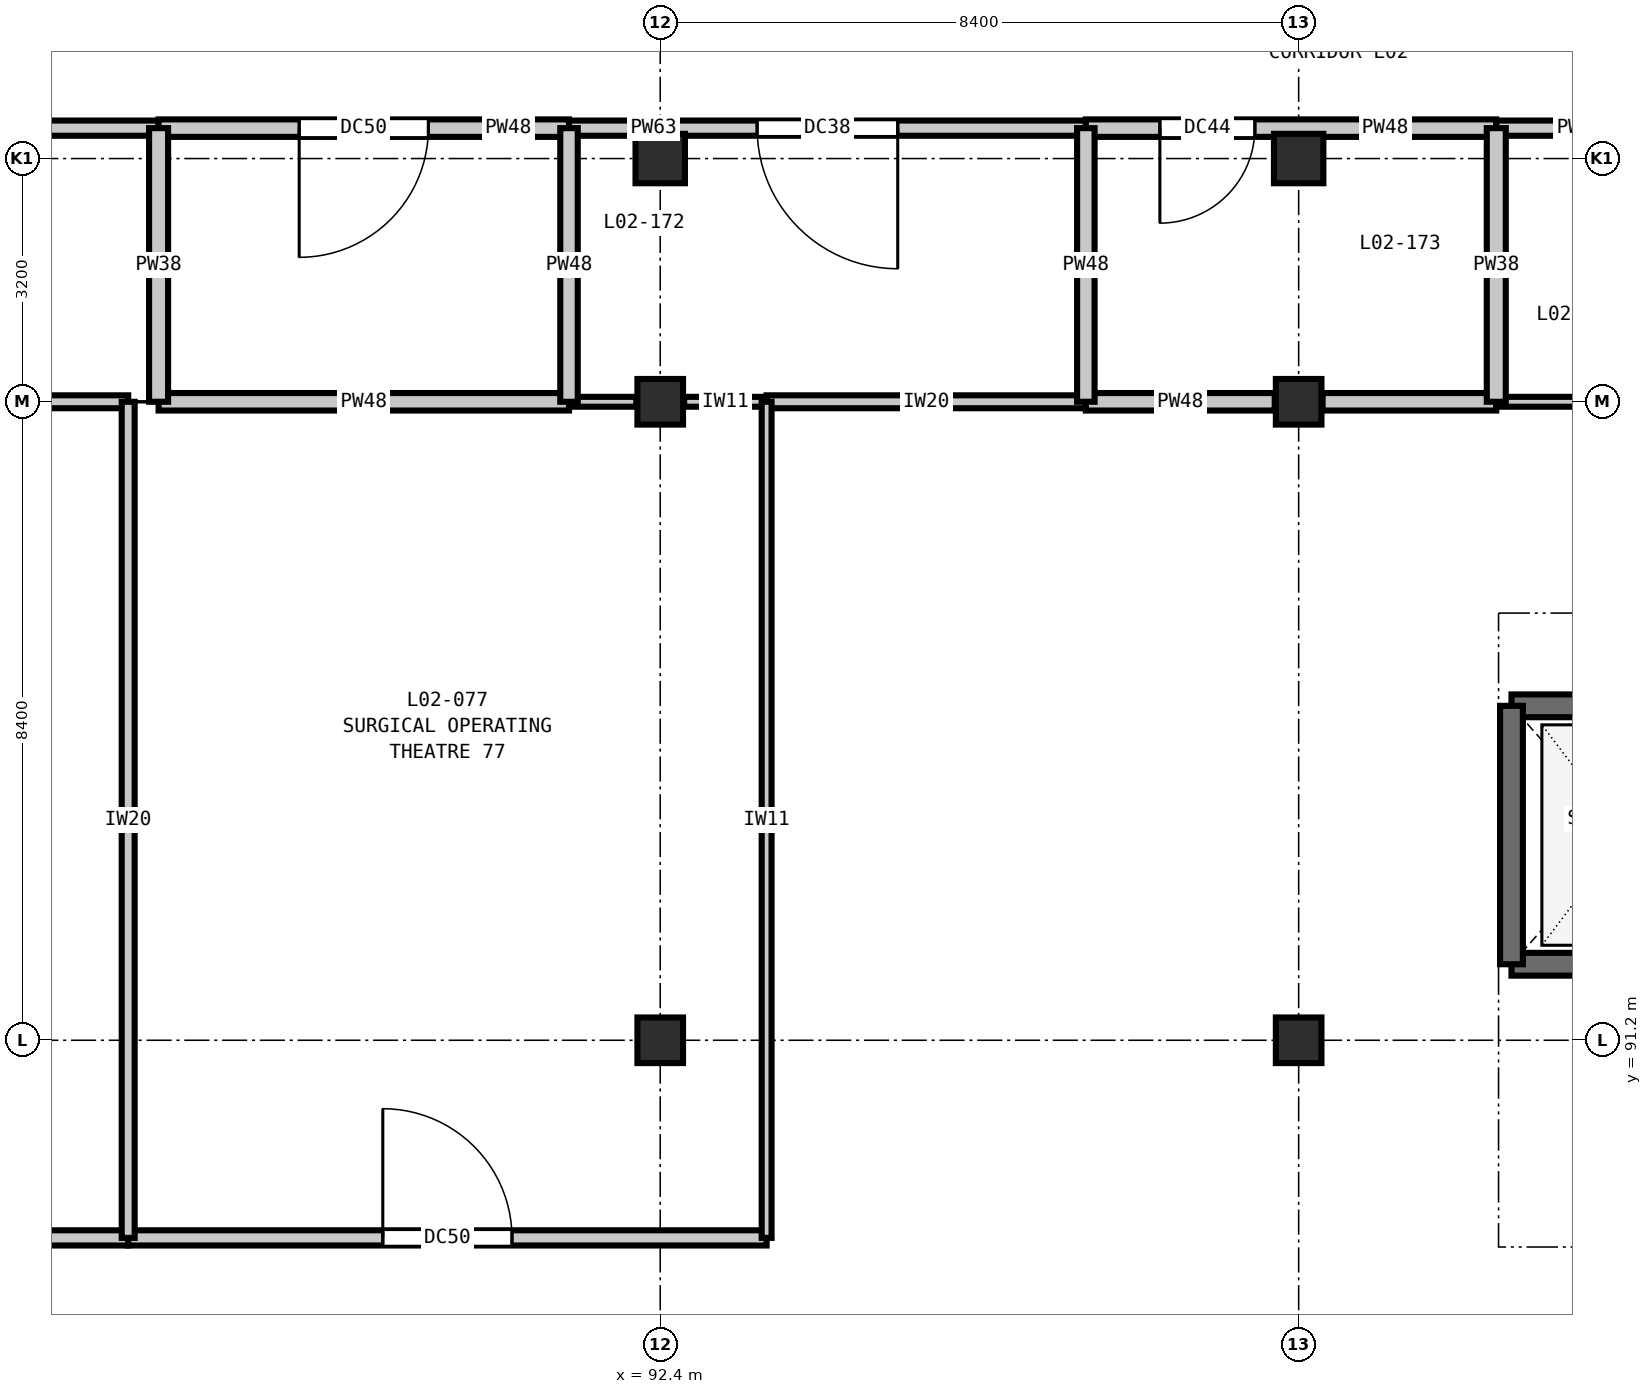
"""IFC4 building model, lengths in metres.
Left out: names, types, materials, properties, quantities, classifications, styles, units other than length and angle.
Written with IfcOpenShell. Run it as: python <this file> out.ifc"""

import sys

from ifc_helpers import new_model, si_unit, direction, frame, frame_2d, origin, origin_2d, place, context, subcontext, project, spatial, rectangle, extrude, element, fill, save


model = new_model("IFC4")
c1 = context("Model", 3, precision=1e-05, world=origin(), true_north=direction((0.0, 1.0)))
c2 = subcontext(c1, "Body", "Model", "MODEL_VIEW")
j1 = project(units=[si_unit("LENGTHUNIT", "METRE"), si_unit("PLANEANGLEUNIT", "RADIAN")], contexts=[c1])
p1 = place(None, origin())
s1 = spatial("IfcSite", under=j1, at=p1, CompositionType="ELEMENT")
p2 = place(p1, origin())
s2 = spatial("IfcBuilding", under=s1, at=p2, CompositionType="ELEMENT")
p3 = place(p2, frame((0.0, 0.0, 10.8)))
s3 = spatial("IfcBuildingStorey", under=s2, at=p3, CompositionType="ELEMENT", Elevation=10.8)
for number, where, z_axis, x_axis in (
    (1, (92.4, 91.2, 0.0), (0.0, 0.0, 1.0), (1.0, 0.0, 0.0)),
    (2, (92.4, 99.6, 0.0), (0.0, 0.0, 1.0), (1.0, 0.0, 0.0)),
):
    element("IfcColumn", number, at=place(p3, frame(where, z_axis=z_axis, x_axis=x_axis)), inside=s3, PredefinedType="COLUMN", context=c2, shape_type="SweptSolid", body=[
        extrude(rectangle(XDim=0.6, YDim=0.6, at=origin_2d()), origin(), (0.0, 0.0, 1.0), 5.4),
    ])
p4 = place(p3, frame((92.4, 102.8, 0.0), z_axis=(0.0, 0.0, 1.0), x_axis=(1.0, 0.0, 0.0)))
e3 = element("IfcColumn", 3, at=p4, inside=s3, PredefinedType="COLUMN", context=c2, shape_type="SweptSolid", body=[
    extrude(rectangle(XDim=0.65, YDim=0.65, at=origin_2d()), origin(), (0.0, 0.0, 1.0), 5.4),
])
for number, where, z_axis, x_axis in (
    (4, (100.8, 91.2, 0.0), (0.0, 0.0, 1.0), (1.0, 0.0, 0.0)),
    (5, (100.8, 99.6, 0.0), (0.0, 0.0, 1.0), (1.0, 0.0, 0.0)),
):
    element("IfcColumn", number, at=place(p3, frame(where, z_axis=z_axis, x_axis=x_axis)), inside=s3, PredefinedType="COLUMN", context=c2, shape_type="SweptSolid", body=[
        extrude(rectangle(XDim=0.6, YDim=0.6, at=origin_2d()), origin(), (0.0, 0.0, 1.0), 5.4),
    ])
p5 = place(p3, frame((100.8, 102.8, 0.0), z_axis=(0.0, 0.0, 1.0), x_axis=(1.0, 0.0, 0.0)))
e6 = element("IfcColumn", 6, at=p5, inside=s3, PredefinedType="COLUMN", context=c2, shape_type="SweptSolid", body=[
    extrude(rectangle(XDim=0.65, YDim=0.65, at=origin_2d()), origin(), (0.0, 0.0, 1.0), 5.4),
])
p6 = place(p3, frame((103.6, 92.2, 0.0), z_axis=(0.0, 0.0, 1.0), x_axis=(1.0, 0.0, 0.0)))
e7 = element("IfcWall", 7, at=p6, inside=s3, PredefinedType="SHEAR", context=c2, shape_type="SweptSolid", body=[
    extrude(rectangle(XDim=3.0, YDim=0.3, at=frame_2d((1.5, 0.0))), origin(), (0.0, 0.0, 1.0), 5.4),
])
p7 = place(p6, frame((0.85, 0.0, 0.0)))
e8 = element("IfcOpeningElement", 8, at=p7, cuts=e7, PredefinedType="OPENING", context=c2, shape_type="SweptSolid", body=[
    extrude(rectangle(XDim=1.3, YDim=2.2, at=frame_2d((0.65, 1.1))), frame((0.0, 0.16, 0.0), z_axis=(0.0, -1.0, 0.0), x_axis=(1.0, 0.0, 0.0)), (0.0, 0.0, 1.0), 0.32),
])
p8 = place(p3, frame((106.6, 95.6, 0.0), z_axis=(0.0, 0.0, 1.0), x_axis=(-1.0, 0.0, 0.0)))
e9 = element("IfcWall", 9, at=p8, inside=s3, PredefinedType="SHEAR", context=c2, shape_type="SweptSolid", body=[
    extrude(rectangle(XDim=3.0, YDim=0.3, at=frame_2d((1.5, 0.0))), origin(), (0.0, 0.0, 1.0), 5.4),
])
p9 = place(p3, frame((103.6, 95.6, 0.0), z_axis=(0.0, 0.0, 1.0), x_axis=(0.0, -1.0, 0.0)))
e10 = element("IfcWall", 10, at=p9, inside=s3, PredefinedType="SHEAR", context=c2, shape_type="SweptSolid", body=[
    extrude(rectangle(XDim=3.4, YDim=0.3, at=frame_2d((1.7, 0.0))), origin(), (0.0, 0.0, 1.0), 5.4),
])
p10 = place(p3, frame((75.6, 88.6, 0.0), z_axis=(0.0, 0.0, 1.0), x_axis=(1.0, 0.0, 0.0)))
e11 = element("IfcWall", 11, at=p10, inside=s3, PredefinedType="PARTITIONING", context=c2, shape_type="SweptSolid", body=[
    extrude(rectangle(XDim=9.8, YDim=0.2, at=frame_2d((4.9, 0.0))), origin(), (0.0, 0.0, 1.0), 5.07),
])
p11 = place(p10, frame((4.125, 0.0, 0.0)))
e12 = element("IfcOpeningElement", 12, at=p11, cuts=e11, PredefinedType="OPENING", context=c2, shape_type="SweptSolid", body=[
    extrude(rectangle(XDim=1.55, YDim=2.25, at=frame_2d((0.775, 1.125))), frame((0.0, 0.11, 0.0), z_axis=(0.0, -1.0, 0.0), x_axis=(1.0, 0.0, 0.0)), (0.0, 0.0, 1.0), 0.22),
])
p12 = place(p3, frame((85.4, 88.6, 0.0), z_axis=(0.0, 0.0, 1.0), x_axis=(1.0, 0.0, 0.0)))
e13 = element("IfcWall", 13, at=p12, inside=s3, PredefinedType="PARTITIONING", context=c2, shape_type="SweptSolid", body=[
    extrude(rectangle(XDim=8.4, YDim=0.2, at=frame_2d((4.2, 0.0))), origin(), (0.0, 0.0, 1.0), 5.07),
])
p13 = place(p12, frame((3.35, 0.0, 0.0)))
e14 = element("IfcOpeningElement", 14, at=p13, cuts=e13, PredefinedType="OPENING", context=c2, shape_type="SweptSolid", body=[
    extrude(rectangle(XDim=1.7, YDim=2.3, at=frame_2d((0.85, 1.15))), frame((0.0, 0.11, 0.0), z_axis=(0.0, -1.0, 0.0), x_axis=(1.0, 0.0, 0.0)), (0.0, 0.0, 1.0), 0.22),
])
p14 = place(p3, frame((84.315, 99.6, 0.0), z_axis=(0.0, 0.0, 1.0), x_axis=(1.0, 0.0, 0.0)))
e15 = element("IfcWall", 15, at=p14, inside=s3, PredefinedType="PARTITIONING", context=c2, shape_type="SweptSolid", body=[
    extrude(rectangle(XDim=1.085, YDim=0.17, at=frame_2d((0.542, 0.0))), origin(), (0.0, 0.0, 1.0), 4.735),
])
p15 = place(p3, frame((85.8, 99.6, 0.0), z_axis=(0.0, 0.0, 1.0), x_axis=(1.0, 0.0, 0.0)))
e16 = element("IfcWall", 16, at=p15, inside=s3, PredefinedType="PARTITIONING", context=c2, shape_type="SweptSolid", body=[
    extrude(rectangle(XDim=5.4, YDim=0.23, at=frame_2d((2.7, 0.0))), origin(), (0.0, 0.0, 1.0), 4.735),
])
p16 = place(p3, frame((92.715, 99.6, 0.0), z_axis=(0.0, 0.0, 1.0), x_axis=(1.0, 0.0, 0.0)))
e17 = element("IfcWall", 17, at=p16, inside=s3, PredefinedType="PARTITIONING", context=c2, shape_type="SweptSolid", body=[
    extrude(rectangle(XDim=1.085, YDim=0.13, at=frame_2d((0.542, 0.0))), origin(), (0.0, 0.0, 1.0), 4.735),
])
p17 = place(p3, frame((91.2, 99.6, 0.0), z_axis=(0.0, 0.0, 1.0), x_axis=(1.0, 0.0, 0.0)))
e18 = element("IfcWall", 18, at=p17, inside=s3, PredefinedType="PARTITIONING", context=c2, shape_type="SweptSolid", body=[
    extrude(rectangle(XDim=0.885, YDim=0.13, at=frame_2d((0.442, 0.0))), origin(), (0.0, 0.0, 1.0), 4.735),
])
p18 = place(p3, frame((93.8, 99.6, 0.0), z_axis=(0.0, 0.0, 1.0), x_axis=(1.0, 0.0, 0.0)))
e19 = element("IfcWall", 19, at=p18, inside=s3, PredefinedType="PARTITIONING", context=c2, shape_type="SweptSolid", body=[
    extrude(rectangle(XDim=4.2, YDim=0.17, at=frame_2d((2.1, 0.0))), origin(), (0.0, 0.0, 1.0), 4.735),
])
p19 = place(p3, frame((98.0, 99.6, 0.0), z_axis=(0.0, 0.0, 1.0), x_axis=(1.0, 0.0, 0.0)))
e20 = element("IfcWall", 20, at=p19, inside=s3, PredefinedType="PARTITIONING", context=c2, shape_type="SweptSolid", body=[
    extrude(rectangle(XDim=2.485, YDim=0.23, at=frame_2d((1.243, 0.0))), origin(), (0.0, 0.0, 1.0), 4.735),
])
p20 = place(p3, frame((101.115, 99.6, 0.0), z_axis=(0.0, 0.0, 1.0), x_axis=(1.0, 0.0, 0.0)))
e21 = element("IfcWall", 21, at=p20, inside=s3, PredefinedType="PARTITIONING", context=c2, shape_type="SweptSolid", body=[
    extrude(rectangle(XDim=2.285, YDim=0.23, at=frame_2d((1.143, 0.0))), origin(), (0.0, 0.0, 1.0), 4.735),
])
p21 = place(p3, frame((103.4, 99.6, 0.0), z_axis=(0.0, 0.0, 1.0), x_axis=(1.0, 0.0, 0.0)))
e22 = element("IfcWall", 22, at=p21, inside=s3, PredefinedType="PARTITIONING", context=c2, shape_type="SweptSolid", body=[
    extrude(rectangle(XDim=5.485, YDim=0.13, at=frame_2d((2.743, 0.0))), origin(), (0.0, 0.0, 1.0), 4.735),
])
p22 = place(p3, frame((79.0, 103.2, 0.0), z_axis=(0.0, 0.0, 1.0), x_axis=(1.0, 0.0, 0.0)))
e23 = element("IfcWall", 23, at=p22, inside=s3, PredefinedType="PARTITIONING", context=c2, shape_type="SweptSolid", body=[
    extrude(rectangle(XDim=6.8, YDim=0.2, at=frame_2d((3.4, 0.0))), origin(), (0.0, 0.0, 1.0), 5.07),
])
p23 = place(p22, frame((2.625, 0.0, 0.0)))
e24 = element("IfcOpeningElement", 24, at=p23, cuts=e23, PredefinedType="OPENING", context=c2, shape_type="SweptSolid", body=[
    extrude(rectangle(XDim=1.55, YDim=2.25, at=frame_2d((0.775, 1.125))), frame((0.0, 0.11, 0.0), z_axis=(0.0, -1.0, 0.0), x_axis=(1.0, 0.0, 0.0)), (0.0, 0.0, 1.0), 0.22),
])
p24 = place(p3, frame((85.8, 103.2, 0.0), z_axis=(0.0, 0.0, 1.0), x_axis=(1.0, 0.0, 0.0)))
e25 = element("IfcWall", 25, at=p24, inside=s3, PredefinedType="PARTITIONING", context=c2, shape_type="SweptSolid", body=[
    extrude(rectangle(XDim=5.4, YDim=0.23, at=frame_2d((2.7, 0.0))), origin(), (0.0, 0.0, 1.0), 5.07),
])
p25 = place(p24, frame((1.85, 0.0, 0.0)))
e26 = element("IfcOpeningElement", 26, at=p25, cuts=e25, PredefinedType="OPENING", context=c2, shape_type="SweptSolid", body=[
    extrude(rectangle(XDim=1.7, YDim=2.3, at=frame_2d((0.85, 1.15))), frame((0.0, 0.125, 0.0), z_axis=(0.0, -1.0, 0.0), x_axis=(1.0, 0.0, 0.0)), (0.0, 0.0, 1.0), 0.25),
])
p26 = place(p3, frame((91.2, 103.2, 0.0), z_axis=(0.0, 0.0, 1.0), x_axis=(1.0, 0.0, 0.0)))
e27 = element("IfcWall", 27, at=p26, inside=s3, PredefinedType="PARTITIONING", context=c2, shape_type="SweptSolid", body=[
    extrude(rectangle(XDim=6.8, YDim=0.2, at=frame_2d((3.4, 0.0))), origin(), (0.0, 0.0, 1.0), 5.07),
])
p27 = place(p26, frame((2.475, 0.0, 0.0)))
e28 = element("IfcOpeningElement", 28, at=p27, cuts=e27, PredefinedType="OPENING", context=c2, shape_type="SweptSolid", body=[
    extrude(rectangle(XDim=1.85, YDim=2.3, at=frame_2d((0.925, 1.15))), frame((0.0, 0.11, 0.0), z_axis=(0.0, -1.0, 0.0), x_axis=(1.0, 0.0, 0.0)), (0.0, 0.0, 1.0), 0.22),
])
p28 = place(p3, frame((98.0, 103.2, 0.0), z_axis=(0.0, 0.0, 1.0), x_axis=(1.0, 0.0, 0.0)))
e29 = element("IfcWall", 29, at=p28, inside=s3, PredefinedType="PARTITIONING", context=c2, shape_type="SweptSolid", body=[
    extrude(rectangle(XDim=5.4, YDim=0.23, at=frame_2d((2.7, 0.0))), origin(), (0.0, 0.0, 1.0), 5.07),
])
p29 = place(p28, frame((0.974, 0.0, 0.0)))
e30 = element("IfcOpeningElement", 30, at=p29, cuts=e29, PredefinedType="OPENING", context=c2, shape_type="SweptSolid", body=[
    extrude(rectangle(XDim=1.25, YDim=2.15, at=frame_2d((0.625, 1.075))), frame((0.0, 0.125, 0.0), z_axis=(0.0, -1.0, 0.0), x_axis=(1.0, 0.0, 0.0)), (0.0, 0.0, 1.0), 0.25),
])
p30 = place(p3, frame((103.4, 103.2, 0.0), z_axis=(0.0, 0.0, 1.0), x_axis=(1.0, 0.0, 0.0)))
e31 = element("IfcWall", 31, at=p30, inside=s3, PredefinedType="PARTITIONING", context=c2, shape_type="SweptSolid", body=[
    extrude(rectangle(XDim=6.2, YDim=0.2, at=frame_2d((3.1, 0.0))), origin(), (0.0, 0.0, 1.0), 5.07),
])
p31 = place(p30, frame((2.45, 0.0, 0.0)))
e32 = element("IfcOpeningElement", 32, at=p31, cuts=e31, PredefinedType="OPENING", context=c2, shape_type="SweptSolid", body=[
    extrude(rectangle(XDim=1.3, YDim=2.2, at=frame_2d((0.65, 1.1))), frame((0.0, 0.11, 0.0), z_axis=(0.0, -1.0, 0.0), x_axis=(1.0, 0.0, 0.0)), (0.0, 0.0, 1.0), 0.22),
])
p32 = place(p3, frame((85.4, 88.6, 0.0), z_axis=(0.0, 0.0, 1.0), x_axis=(0.0, 1.0, 0.0)))
e33 = element("IfcWall", 33, at=p32, inside=s3, PredefinedType="PARTITIONING", context=c2, shape_type="SweptSolid", body=[
    extrude(rectangle(XDim=11.0, YDim=0.17, at=frame_2d((5.5, 0.0))), origin(), (0.0, 0.0, 1.0), 5.07),
])
p33 = place(p3, frame((85.8, 99.6, 0.0), z_axis=(0.0, 0.0, 1.0), x_axis=(0.0, 1.0, 0.0)))
e34 = element("IfcWall", 34, at=p33, inside=s3, PredefinedType="PARTITIONING", context=c2, shape_type="SweptSolid", body=[
    extrude(rectangle(XDim=3.6, YDim=0.25, at=frame_2d((1.8, 0.0))), origin(), (0.0, 0.0, 1.0), 5.07),
])
p34 = place(p3, frame((91.2, 99.6, 0.0), z_axis=(0.0, 0.0, 1.0), x_axis=(0.0, 1.0, 0.0)))
e35 = element("IfcWall", 35, at=p34, inside=s3, PredefinedType="PARTITIONING", context=c2, shape_type="SweptSolid", body=[
    extrude(rectangle(XDim=3.6, YDim=0.23, at=frame_2d((1.8, 0.0))), origin(), (0.0, 0.0, 1.0), 5.07),
])
p35 = place(p3, frame((93.8, 88.6, 0.0), z_axis=(0.0, 0.0, 1.0), x_axis=(0.0, 1.0, 0.0)))
e36 = element("IfcWall", 36, at=p35, inside=s3, PredefinedType="PARTITIONING", context=c2, shape_type="SweptSolid", body=[
    extrude(rectangle(XDim=11.0, YDim=0.13, at=frame_2d((5.5, 0.0))), origin(), (0.0, 0.0, 1.0), 5.07),
])
p36 = place(p3, frame((98.0, 99.6, 0.0), z_axis=(0.0, 0.0, 1.0), x_axis=(0.0, 1.0, 0.0)))
e37 = element("IfcWall", 37, at=p36, inside=s3, PredefinedType="PARTITIONING", context=c2, shape_type="SweptSolid", body=[
    extrude(rectangle(XDim=3.6, YDim=0.23, at=frame_2d((1.8, 0.0))), origin(), (0.0, 0.0, 1.0), 5.07),
])
p37 = place(p3, frame((103.4, 99.6, 0.0), z_axis=(0.0, 0.0, 1.0), x_axis=(0.0, 1.0, 0.0)))
e38 = element("IfcWall", 38, at=p37, inside=s3, PredefinedType="PARTITIONING", context=c2, shape_type="SweptSolid", body=[
    extrude(rectangle(XDim=3.6, YDim=0.25, at=frame_2d((1.8, 0.0))), origin(), (0.0, 0.0, 1.0), 5.07),
])
p38 = place(p13, origin())
e39 = element("IfcDoor", 39, at=p38, inside=s3, OperationType="SINGLE_SWING_LEFT", PredefinedType="DOOR", context=c2, shape_type="SweptSolid", body=[
    extrude(rectangle(XDim=1.7, YDim=2.3, at=frame_2d((0.85, 1.15))), frame((0.0, 0.025, 0.0), z_axis=(0.0, -1.0, 0.0), x_axis=(1.0, 0.0, 0.0)), (0.0, 0.0, 1.0), 0.05),
])
fill(e14, e39)
p39 = place(p25, frame((1.7, 0.0, 0.0), z_axis=(0.0, 0.0, 1.0), x_axis=(-1.0, 0.0, 0.0)))
e40 = element("IfcDoor", 40, at=p39, inside=s3, OperationType="SINGLE_SWING_RIGHT", PredefinedType="DOOR", context=c2, shape_type="SweptSolid", body=[
    extrude(rectangle(XDim=1.7, YDim=2.3, at=frame_2d((0.85, 1.15))), frame((0.0, 0.025, 0.0), z_axis=(0.0, -1.0, 0.0), x_axis=(1.0, 0.0, 0.0)), (0.0, 0.0, 1.0), 0.05),
])
fill(e26, e40)
p40 = place(p27, frame((1.85, 0.0, 0.0), z_axis=(0.0, 0.0, 1.0), x_axis=(-1.0, 0.0, 0.0)))
e41 = element("IfcDoor", 41, at=p40, inside=s3, OperationType="SINGLE_SWING_LEFT", PredefinedType="DOOR", context=c2, shape_type="SweptSolid", body=[
    extrude(rectangle(XDim=1.85, YDim=2.3, at=frame_2d((0.925, 1.15))), frame((0.0, 0.025, 0.0), z_axis=(0.0, -1.0, 0.0), x_axis=(1.0, 0.0, 0.0)), (0.0, 0.0, 1.0), 0.05),
])
fill(e28, e41)
p41 = place(p29, frame((1.25, 0.0, 0.0), z_axis=(0.0, 0.0, 1.0), x_axis=(-1.0, 0.0, 0.0)))
e42 = element("IfcDoor", 42, at=p41, inside=s3, OperationType="SINGLE_SWING_RIGHT", PredefinedType="DOOR", context=c2, shape_type="SweptSolid", body=[
    extrude(rectangle(XDim=1.25, YDim=2.15, at=frame_2d((0.625, 1.075))), frame((0.0, 0.025, 0.0), z_axis=(0.0, -1.0, 0.0), x_axis=(1.0, 0.0, 0.0)), (0.0, 0.0, 1.0), 0.05),
])
fill(e30, e42)
save(model, sys.argv[1])
